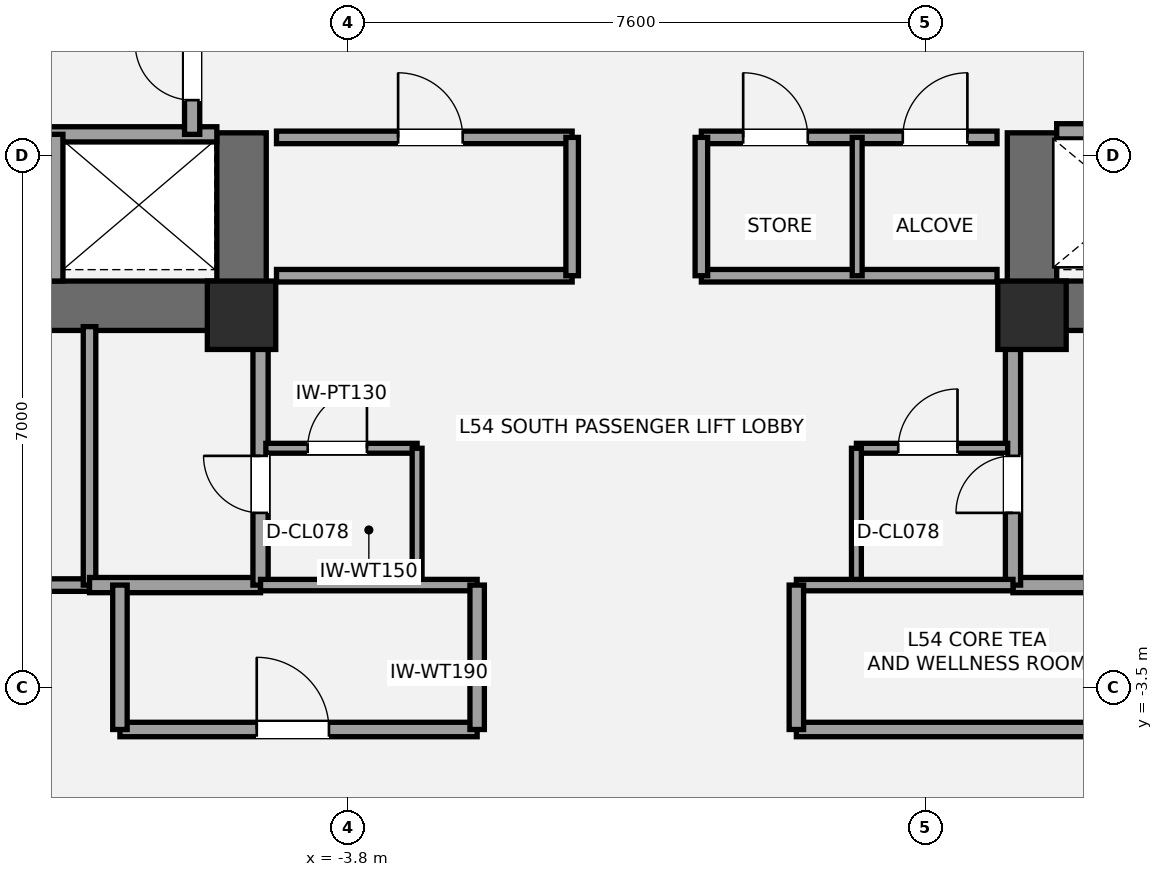
"""IFC4 building model, lengths in metres.
Left out: names, types, materials, properties, quantities, classifications, styles, units other than length and angle.
Written with IfcOpenShell. Run it as: python <this file> out.ifc"""

import sys

from ifc_helpers import new_model, si_unit, direction, frame, frame_2d, origin, origin_2d, place, context, subcontext, project, spatial, rectangle, extrude, element, fill, save


model = new_model("IFC4")
c1 = context("Model", 3, precision=1e-05, world=origin(), true_north=direction((0.0, 1.0)))
c2 = subcontext(c1, "Body", "Model", "MODEL_VIEW")
j1 = project(units=[si_unit("LENGTHUNIT", "METRE"), si_unit("PLANEANGLEUNIT", "RADIAN")], contexts=[c1])
p1 = place(None, origin())
s1 = spatial("IfcSite", under=j1, at=p1, CompositionType="ELEMENT")
p2 = place(p1, origin())
s2 = spatial("IfcBuilding", under=s1, at=p2, CompositionType="ELEMENT")
p3 = place(p2, frame((0.0, 0.0, 195.0)))
s3 = spatial("IfcBuildingStorey", under=s2, at=p3, CompositionType="ELEMENT", Elevation=195.0)
p4 = place(p3, frame((-4.875, 1.525, 0.0), z_axis=(0.0, 0.0, 1.0), x_axis=(-1.0, 0.0, 0.0)))
e1 = element("IfcWall", 1, at=p4, inside=s3, PredefinedType="SHEAR", context=c2, shape_type="SweptSolid", body=[
    extrude(rectangle(XDim=8.925, YDim=0.65, at=frame_2d((4.462, 0.0))), origin(), (0.0, 0.0, 1.0), 3.2),
])
p5 = place(p4, frame((5.425, 0.0, 0.0)))
e2 = element("IfcOpeningElement", 2, at=p5, cuts=e1, PredefinedType="OPENING", context=c2, shape_type="SweptSolid", body=[
    extrude(rectangle(XDim=1.05, YDim=2.15, at=frame_2d((0.525, 1.075))), frame((0.0, 0.335, 0.0), z_axis=(0.0, -1.0, 0.0), x_axis=(1.0, 0.0, 0.0)), (0.0, 0.0, 1.0), 0.67),
])
p6 = place(p4, frame((3.755, 0.0, 0.0)))
e3 = element("IfcOpeningElement", 3, at=p6, cuts=e1, PredefinedType="OPENING", context=c2, shape_type="SweptSolid", body=[
    extrude(rectangle(XDim=1.1, YDim=2.2, at=frame_2d((0.55, 1.1))), frame((0.0, 0.335, 0.0), z_axis=(0.0, -1.0, 0.0), x_axis=(1.0, 0.0, 0.0)), (0.0, 0.0, 1.0), 0.67),
])
p7 = place(p3, frame((-5.2, 1.2, 0.0), z_axis=(0.0, 0.0, 1.0), x_axis=(0.0, 1.0, 0.0)))
e4 = element("IfcWall", 4, at=p7, inside=s3, PredefinedType="SHEAR", context=c2, shape_type="SweptSolid", body=[
    extrude(rectangle(XDim=2.6, YDim=0.65, at=frame_2d((1.3, 0.0))), origin(), (0.0, 0.0, 1.0), 3.2),
])
p8 = place(p3, frame((13.8, 1.525, 0.0), z_axis=(0.0, 0.0, 1.0), x_axis=(-1.0, 0.0, 0.0)))
e5 = element("IfcWall", 5, at=p8, inside=s3, PredefinedType="SHEAR", context=c2, shape_type="SweptSolid", body=[
    extrude(rectangle(XDim=8.925, YDim=0.65, at=frame_2d((4.462, 0.0))), origin(), (0.0, 0.0, 1.0), 3.2),
])
p9 = place(p8, frame((2.45, 0.0, 0.0)))
e6 = element("IfcOpeningElement", 6, at=p9, cuts=e5, PredefinedType="OPENING", context=c2, shape_type="SweptSolid", body=[
    extrude(rectangle(XDim=1.05, YDim=2.15, at=frame_2d((0.525, 1.075))), frame((0.0, 0.335, 0.0), z_axis=(0.0, -1.0, 0.0), x_axis=(1.0, 0.0, 0.0)), (0.0, 0.0, 1.0), 0.67),
])
p10 = place(p8, frame((4.45, 0.0, 0.0)))
e7 = element("IfcOpeningElement", 7, at=p10, cuts=e5, PredefinedType="OPENING", context=c2, shape_type="SweptSolid", body=[
    extrude(rectangle(XDim=1.1, YDim=2.2, at=frame_2d((0.55, 1.1))), frame((0.0, 0.335, 0.0), z_axis=(0.0, -1.0, 0.0), x_axis=(1.0, 0.0, 0.0)), (0.0, 0.0, 1.0), 0.67),
])
p11 = place(p3, frame((5.2, 1.2, 0.0), z_axis=(0.0, 0.0, 1.0), x_axis=(0.0, 1.0, 0.0)))
e8 = element("IfcWall", 8, at=p11, inside=s3, PredefinedType="SHEAR", context=c2, shape_type="SweptSolid", body=[
    extrude(rectangle(XDim=2.6, YDim=0.65, at=frame_2d((1.3, 0.0))), origin(), (0.0, 0.0, 1.0), 3.2),
])
for number, where, z_axis, x_axis in (
    (9, (-5.2, 1.4, 0.0), (0.0, 0.0, 1.0), (1.0, 0.0, 0.0)),
    (10, (5.2, 1.4, 0.0), (0.0, 0.0, 1.0), (1.0, 0.0, 0.0)),
):
    element("IfcColumn", number, at=place(p3, frame(where, z_axis=z_axis, x_axis=x_axis)), inside=s3, PredefinedType="COLUMN", context=c2, shape_type="SweptSolid", body=[
        extrude(rectangle(XDim=0.9, YDim=0.9, at=origin_2d()), origin(), (0.0, 0.0, 1.0), 3.2),
    ])
p12 = place(p3, frame((-13.45, -2.15, 0.0), z_axis=(0.0, 0.0, 1.0), x_axis=(1.0, 0.0, 0.0)))
e11 = element("IfcWall", 11, at=p12, inside=s3, PredefinedType="PARTITIONING", context=c2, shape_type="SweptSolid", body=[
    extrude(rectangle(XDim=6.25, YDim=0.165, at=frame_2d((3.125, 0.0))), origin(), (0.0, 0.0, 1.0), 3.02),
])
p13 = place(p3, frame((-7.2, -2.15, 0.0), z_axis=(0.0, 0.0, 1.0), x_axis=(0.0, 1.0, 0.0)))
e12 = element("IfcWall", 12, at=p13, inside=s3, PredefinedType="PARTITIONING", context=c2, shape_type="SweptSolid", body=[
    extrude(rectangle(XDim=3.4, YDim=0.165, at=frame_2d((1.7, 0.0))), origin(), (0.0, 0.0, 1.0), 2.473),
])
p14 = place(p3, frame((-7.2, -2.15, 0.0), z_axis=(0.0, 0.0, 1.0), x_axis=(1.0, 0.0, 0.0)))
e13 = element("IfcWall", 13, at=p14, inside=s3, PredefinedType="SOLIDWALL", context=c2, shape_type="SweptSolid", body=[
    extrude(rectangle(XDim=2.25, YDim=0.2, at=frame_2d((1.125, 0.0))), origin(), (0.0, 0.0, 1.0), 3.02),
])
p15 = place(p3, frame((-4.95, -2.15, 0.0), z_axis=(0.0, 0.0, 1.0), x_axis=(0.0, 1.0, 0.0)))
e14 = element("IfcWall", 14, at=p15, inside=s3, PredefinedType="SOLIDWALL", context=c2, shape_type="SweptSolid", body=[
    extrude(rectangle(XDim=3.4, YDim=0.2, at=frame_2d((1.7, 0.0))), origin(), (0.0, 0.0, 1.0), 2.473),
])
p16 = place(p15, frame((0.95, 0.0, 0.0)))
e15 = element("IfcOpeningElement", 15, at=p16, cuts=e14, PredefinedType="OPENING", context=c2, shape_type="SweptSolid", body=[
    extrude(rectangle(XDim=0.75, YDim=2.1, at=frame_2d((0.375, 1.05))), frame((0.0, 0.11, 0.0), z_axis=(0.0, -1.0, 0.0), x_axis=(1.0, 0.0, 0.0)), (0.0, 0.0, 1.0), 0.22),
])
p17 = place(p3, frame((4.95, -2.15, 0.0), z_axis=(0.0, 0.0, 1.0), x_axis=(1.0, 0.0, 0.0)))
e16 = element("IfcWall", 16, at=p17, inside=s3, PredefinedType="SOLIDWALL", context=c2, shape_type="SweptSolid", body=[
    extrude(rectangle(XDim=2.25, YDim=0.2, at=frame_2d((1.125, 0.0))), origin(), (0.0, 0.0, 1.0), 3.02),
])
p18 = place(p3, frame((4.95, -2.15, 0.0), z_axis=(0.0, 0.0, 1.0), x_axis=(0.0, 1.0, 0.0)))
e17 = element("IfcWall", 17, at=p18, inside=s3, PredefinedType="SOLIDWALL", context=c2, shape_type="SweptSolid", body=[
    extrude(rectangle(XDim=3.4, YDim=0.2, at=frame_2d((1.7, 0.0))), origin(), (0.0, 0.0, 1.0), 2.473),
])
p19 = place(p18, frame((0.95, 0.0, 0.0)))
e18 = element("IfcOpeningElement", 18, at=p19, cuts=e17, PredefinedType="OPENING", context=c2, shape_type="SweptSolid", body=[
    extrude(rectangle(XDim=0.75, YDim=2.1, at=frame_2d((0.375, 1.05))), frame((0.0, 0.11, 0.0), z_axis=(0.0, -1.0, 0.0), x_axis=(1.0, 0.0, 0.0)), (0.0, 0.0, 1.0), 0.22),
])
p20 = place(p3, frame((-4.88, -0.35, 0.0), z_axis=(0.0, 0.0, 1.0), x_axis=(1.0, 0.0, 0.0)))
e19 = element("IfcWall", 19, at=p20, inside=s3, PredefinedType="PARTITIONING", context=c2, shape_type="SweptSolid", body=[
    extrude(rectangle(XDim=1.99, YDim=0.13, at=frame_2d((0.995, 0.0))), origin(), (0.0, 0.0, 1.0), 3.02),
])
p21 = place(p20, frame((0.55, 0.0, 0.0)))
e20 = element("IfcOpeningElement", 20, at=p21, cuts=e19, PredefinedType="OPENING", context=c2, shape_type="SweptSolid", body=[
    extrude(rectangle(XDim=0.78, YDim=2.1, at=frame_2d((0.39, 1.05))), frame((0.0, 0.075, 0.0), z_axis=(0.0, -1.0, 0.0), x_axis=(1.0, 0.0, 0.0)), (0.0, 0.0, 1.0), 0.15),
])
p22 = place(p3, frame((-2.89, -2.15, 0.0), z_axis=(0.0, 0.0, 1.0), x_axis=(0.0, 1.0, 0.0)))
e21 = element("IfcWall", 21, at=p22, inside=s3, PredefinedType="PARTITIONING", context=c2, shape_type="SweptSolid", body=[
    extrude(rectangle(XDim=1.8, YDim=0.13, at=frame_2d((0.9, 0.0))), origin(), (0.0, 0.0, 1.0), 3.02),
])
p23 = place(p3, frame((2.89, -0.35, 0.0), z_axis=(0.0, 0.0, 1.0), x_axis=(1.0, 0.0, 0.0)))
e22 = element("IfcWall", 22, at=p23, inside=s3, PredefinedType="PARTITIONING", context=c2, shape_type="SweptSolid", body=[
    extrude(rectangle(XDim=1.99, YDim=0.13, at=frame_2d((0.995, 0.0))), origin(), (0.0, 0.0, 1.0), 3.02),
])
p24 = place(p23, frame((0.55, 0.0, 0.0)))
e23 = element("IfcOpeningElement", 23, at=p24, cuts=e22, PredefinedType="OPENING", context=c2, shape_type="SweptSolid", body=[
    extrude(rectangle(XDim=0.78, YDim=2.1, at=frame_2d((0.39, 1.05))), frame((0.0, 0.075, 0.0), z_axis=(0.0, -1.0, 0.0), x_axis=(1.0, 0.0, 0.0)), (0.0, 0.0, 1.0), 0.15),
])
p25 = place(p3, frame((2.89, -2.15, 0.0), z_axis=(0.0, 0.0, 1.0), x_axis=(0.0, 1.0, 0.0)))
e24 = element("IfcWall", 24, at=p25, inside=s3, PredefinedType="PARTITIONING", context=c2, shape_type="SweptSolid", body=[
    extrude(rectangle(XDim=1.8, YDim=0.13, at=frame_2d((0.9, 0.0))), origin(), (0.0, 0.0, 1.0), 3.02),
])
p26 = place(p3, frame((-9.78, 3.78, 0.0), z_axis=(0.0, 0.0, 1.0), x_axis=(1.0, 0.0, 0.0)))
e25 = element("IfcWall", 25, at=p26, inside=s3, PredefinedType="SOLIDWALL", context=c2, shape_type="SweptSolid", body=[
    extrude(rectangle(XDim=4.255, YDim=0.2, at=frame_2d((2.127, 0.0))), origin(), (0.0, 0.0, 1.0), 3.02),
])
p27 = place(p3, frame((-7.65, 1.85, 0.0), z_axis=(0.0, 0.0, 1.0), x_axis=(0.0, 1.0, 0.0)))
e26 = element("IfcWall", 26, at=p27, inside=s3, PredefinedType="SOLIDWALL", context=c2, shape_type="SweptSolid", body=[
    extrude(rectangle(XDim=1.93, YDim=0.2, at=frame_2d((0.965, 0.0))), origin(), (0.0, 0.0, 1.0), 3.02),
])
p28 = place(p3, frame((-5.85, 3.78, 0.0), z_axis=(0.0, 0.0, 1.0), x_axis=(0.0, 1.0, 0.0)))
e27 = element("IfcWall", 27, at=p28, inside=s3, PredefinedType="SOLIDWALL", context=c2, shape_type="SweptSolid", body=[
    extrude(rectangle(XDim=1.69, YDim=0.2, at=frame_2d((0.845, 0.0))), origin(), (0.0, 0.0, 1.0), 3.02),
])
p29 = place(p28, frame((0.45, 0.0, 0.0)))
e28 = element("IfcOpeningElement", 28, at=p29, cuts=e27, PredefinedType="OPENING", context=c2, shape_type="SweptSolid", body=[
    extrude(rectangle(XDim=0.75, YDim=2.1, at=frame_2d((0.375, 1.05))), frame((0.0, 0.11, 0.0), z_axis=(0.0, -1.0, 0.0), x_axis=(1.0, 0.0, 0.0)), (0.0, 0.0, 1.0), 0.22),
])
p30 = place(p3, frame((5.525, 3.82, 0.0), z_axis=(0.0, 0.0, 1.0), x_axis=(1.0, 0.0, 0.0)))
e29 = element("IfcWall", 29, at=p30, inside=s3, PredefinedType="SOLIDWALL", context=c2, shape_type="SweptSolid", body=[
    extrude(rectangle(XDim=4.255, YDim=0.2, at=frame_2d((2.127, 0.0))), origin(), (0.0, 0.0, 1.0), 3.02),
])
p31 = place(p30, frame((0.65, 0.0, 0.0)))
e30 = element("IfcOpeningElement", 30, at=p31, cuts=e29, PredefinedType="OPENING", context=c2, shape_type="SweptSolid", body=[
    extrude(rectangle(XDim=1.2, YDim=2.2, at=frame_2d((0.6, 1.1))), frame((0.0, 0.11, 0.0), z_axis=(0.0, -1.0, 0.0), x_axis=(1.0, 0.0, 0.0)), (0.0, 0.0, 1.0), 0.22),
])
p32 = place(p3, frame((-4.74, 1.92, 0.0), z_axis=(0.0, 0.0, 1.0), x_axis=(1.0, 0.0, 0.0)))
e31 = element("IfcWall", 31, at=p32, inside=s3, PredefinedType="PARTITIONING", context=c2, shape_type="SweptSolid", body=[
    extrude(rectangle(XDim=3.89, YDim=0.165, at=frame_2d((1.945, 0.0))), origin(), (0.0, 0.0, 1.0), 2.16),
])
p33 = place(p3, frame((-4.74, 3.74, 0.0), z_axis=(0.0, 0.0, 1.0), x_axis=(1.0, 0.0, 0.0)))
e32 = element("IfcWall", 32, at=p33, inside=s3, PredefinedType="PARTITIONING", context=c2, shape_type="SweptSolid", body=[
    extrude(rectangle(XDim=3.89, YDim=0.165, at=frame_2d((1.945, 0.0))), origin(), (0.0, 0.0, 1.0), 3.02),
])
p34 = place(p33, frame((1.6, 0.0, 0.0)))
e33 = element("IfcOpeningElement", 33, at=p34, cuts=e32, PredefinedType="OPENING", context=c2, shape_type="SweptSolid", body=[
    extrude(rectangle(XDim=0.85, YDim=2.1, at=frame_2d((0.425, 1.05))), frame((0.0, 0.093, 0.0), z_axis=(0.0, -1.0, 0.0), x_axis=(1.0, 0.0, 0.0)), (0.0, 0.0, 1.0), 0.185),
])
p35 = place(p3, frame((-0.85, 1.92, 0.0), z_axis=(0.0, 0.0, 1.0), x_axis=(0.0, 1.0, 0.0)))
e34 = element("IfcWall", 34, at=p35, inside=s3, PredefinedType="PARTITIONING", context=c2, shape_type="SweptSolid", body=[
    extrude(rectangle(XDim=1.82, YDim=0.165, at=frame_2d((0.91, 0.0))), origin(), (0.0, 0.0, 1.0), 3.02),
])
p36 = place(p3, frame((0.85, 1.92, 0.0), z_axis=(0.0, 0.0, 1.0), x_axis=(1.0, 0.0, 0.0)))
e35 = element("IfcWall", 35, at=p36, inside=s3, PredefinedType="PARTITIONING", context=c2, shape_type="SweptSolid", body=[
    extrude(rectangle(XDim=3.89, YDim=0.165, at=frame_2d((1.945, 0.0))), origin(), (0.0, 0.0, 1.0), 2.16),
])
p37 = place(p3, frame((0.85, 3.74, 0.0), z_axis=(0.0, 0.0, 1.0), x_axis=(1.0, 0.0, 0.0)))
e36 = element("IfcWall", 36, at=p37, inside=s3, PredefinedType="PARTITIONING", context=c2, shape_type="SweptSolid", body=[
    extrude(rectangle(XDim=3.89, YDim=0.165, at=frame_2d((1.945, 0.0))), origin(), (0.0, 0.0, 1.0), 3.02),
])
p38 = place(p37, frame((0.55, 0.0, 0.0)))
e37 = element("IfcOpeningElement", 37, at=p38, cuts=e36, PredefinedType="OPENING", context=c2, shape_type="SweptSolid", body=[
    extrude(rectangle(XDim=0.85, YDim=2.1, at=frame_2d((0.425, 1.05))), frame((0.0, 0.093, 0.0), z_axis=(0.0, -1.0, 0.0), x_axis=(1.0, 0.0, 0.0)), (0.0, 0.0, 1.0), 0.185),
])
p39 = place(p37, frame((2.65, 0.0, 0.0)))
e38 = element("IfcOpeningElement", 38, at=p39, cuts=e36, PredefinedType="OPENING", context=c2, shape_type="SweptSolid", body=[
    extrude(rectangle(XDim=0.85, YDim=2.1, at=frame_2d((0.425, 1.05))), frame((0.0, 0.093, 0.0), z_axis=(0.0, -1.0, 0.0), x_axis=(1.0, 0.0, 0.0)), (0.0, 0.0, 1.0), 0.185),
])
p40 = place(p3, frame((0.85, 1.92, 0.0), z_axis=(0.0, 0.0, 1.0), x_axis=(0.0, 1.0, 0.0)))
e39 = element("IfcWall", 39, at=p40, inside=s3, PredefinedType="PARTITIONING", context=c2, shape_type="SweptSolid", body=[
    extrude(rectangle(XDim=1.82, YDim=0.165, at=frame_2d((0.91, 0.0))), origin(), (0.0, 0.0, 1.0), 3.02),
])
p41 = place(p3, frame((2.9, 1.92, 0.0), z_axis=(0.0, 0.0, 1.0), x_axis=(0.0, 1.0, 0.0)))
e40 = element("IfcWall", 40, at=p41, inside=s3, PredefinedType="PARTITIONING", context=c2, shape_type="SweptSolid", body=[
    extrude(rectangle(XDim=1.82, YDim=0.13, at=frame_2d((0.91, 0.0))), origin(), (0.0, 0.0, 1.0), 3.02),
])
p42 = place(p3, frame((-6.8, -4.05, 0.0), z_axis=(0.0, 0.0, 1.0), x_axis=(1.0, 0.0, 0.0)))
e41 = element("IfcWall", 41, at=p42, inside=s3, PredefinedType="PLUMBINGWALL", context=c2, shape_type="SweptSolid", body=[
    extrude(rectangle(XDim=4.7, YDim=0.19, at=frame_2d((2.35, 0.0))), origin(), (0.0, 0.0, 1.0), 2.473),
])
p43 = place(p42, frame((1.8, 0.0, 0.0)))
e42 = element("IfcOpeningElement", 42, at=p43, cuts=e41, PredefinedType="OPENING", context=c2, shape_type="SweptSolid", body=[
    extrude(rectangle(XDim=0.95, YDim=2.15, at=frame_2d((0.475, 1.075))), frame((0.0, 0.105, 0.0), z_axis=(0.0, -1.0, 0.0), x_axis=(1.0, 0.0, 0.0)), (0.0, 0.0, 1.0), 0.21),
])
p44 = place(p3, frame((-4.95, -2.15, 0.0), z_axis=(0.0, 0.0, 1.0), x_axis=(1.0, 0.0, 0.0)))
e43 = element("IfcWall", 43, at=p44, inside=s3, PredefinedType="PLUMBINGWALL", context=c2, shape_type="SweptSolid", body=[
    extrude(rectangle(XDim=2.85, YDim=0.15, at=frame_2d((1.425, 0.0))), origin(), (0.0, 0.0, 1.0), 3.02),
])
p45 = place(p3, frame((-6.8, -4.05, 0.0), z_axis=(0.0, 0.0, 1.0), x_axis=(0.0, 1.0, 0.0)))
e44 = element("IfcWall", 44, at=p45, inside=s3, PredefinedType="PLUMBINGWALL", context=c2, shape_type="SweptSolid", body=[
    extrude(rectangle(XDim=1.9, YDim=0.19, at=frame_2d((0.95, 0.0))), origin(), (0.0, 0.0, 1.0), 2.473),
])
p46 = place(p3, frame((-2.1, -4.05, 0.0), z_axis=(0.0, 0.0, 1.0), x_axis=(0.0, 1.0, 0.0)))
e45 = element("IfcWall", 45, at=p46, inside=s3, PredefinedType="PLUMBINGWALL", context=c2, shape_type="SweptSolid", body=[
    extrude(rectangle(XDim=1.9, YDim=0.19, at=frame_2d((0.95, 0.0))), origin(), (0.0, 0.0, 1.0), 3.02),
])
p47 = place(p3, frame((2.1, -4.05, 0.0), z_axis=(0.0, 0.0, 1.0), x_axis=(1.0, 0.0, 0.0)))
e46 = element("IfcWall", 46, at=p47, inside=s3, PredefinedType="PLUMBINGWALL", context=c2, shape_type="SweptSolid", body=[
    extrude(rectangle(XDim=11.35, YDim=0.19, at=frame_2d((5.675, 0.0))), origin(), (0.0, 0.0, 1.0), 3.02),
])
p48 = place(p47, frame((5.2, 0.0, 0.0)))
e47 = element("IfcOpeningElement", 47, at=p48, cuts=e46, PredefinedType="OPENING", context=c2, shape_type="SweptSolid", body=[
    extrude(rectangle(XDim=0.9, YDim=2.1, at=frame_2d((0.45, 1.05))), frame((0.0, 0.105, 0.0), z_axis=(0.0, -1.0, 0.0), x_axis=(1.0, 0.0, 0.0)), (0.0, 0.0, 1.0), 0.21),
])
p49 = place(p3, frame((2.1, -2.15, 0.0), z_axis=(0.0, 0.0, 1.0), x_axis=(1.0, 0.0, 0.0)))
e48 = element("IfcWall", 48, at=p49, inside=s3, PredefinedType="PLUMBINGWALL", context=c2, shape_type="SweptSolid", body=[
    extrude(rectangle(XDim=2.85, YDim=0.15, at=frame_2d((1.425, 0.0))), origin(), (0.0, 0.0, 1.0), 3.02),
])
p50 = place(p3, frame((2.1, -4.05, 0.0), z_axis=(0.0, 0.0, 1.0), x_axis=(0.0, 1.0, 0.0)))
e49 = element("IfcWall", 49, at=p50, inside=s3, PredefinedType="PLUMBINGWALL", context=c2, shape_type="SweptSolid", body=[
    extrude(rectangle(XDim=1.9, YDim=0.19, at=frame_2d((0.95, 0.0))), origin(), (0.0, 0.0, 1.0), 3.02),
])
p51 = place(p16, origin())
e50 = element("IfcDoor", 50, at=p51, inside=s3, OperationType="SINGLE_SWING_RIGHT", PredefinedType="DOOR", context=c2, shape_type="SweptSolid", body=[
    extrude(rectangle(XDim=0.75, YDim=2.1, at=frame_2d((0.375, 1.05))), frame((0.0, 0.025, 0.0), z_axis=(0.0, -1.0, 0.0), x_axis=(1.0, 0.0, 0.0)), (0.0, 0.0, 1.0), 0.05),
])
fill(e15, e50)
p52 = place(p19, origin())
e51 = element("IfcDoor", 51, at=p52, inside=s3, OperationType="SINGLE_SWING_LEFT", PredefinedType="DOOR", context=c2, shape_type="SweptSolid", body=[
    extrude(rectangle(XDim=0.75, YDim=2.1, at=frame_2d((0.375, 1.05))), frame((0.0, 0.025, 0.0), z_axis=(0.0, -1.0, 0.0), x_axis=(1.0, 0.0, 0.0)), (0.0, 0.0, 1.0), 0.05),
])
fill(e18, e51)
p53 = place(p21, origin())
e52 = element("IfcDoor", 52, at=p53, inside=s3, OperationType="SINGLE_SWING_RIGHT", PredefinedType="DOOR", context=c2, shape_type="SweptSolid", body=[
    extrude(rectangle(XDim=0.78, YDim=2.1, at=frame_2d((0.39, 1.05))), frame((0.0, 0.025, 0.0), z_axis=(0.0, -1.0, 0.0), x_axis=(1.0, 0.0, 0.0)), (0.0, 0.0, 1.0), 0.05),
])
fill(e20, e52)
p54 = place(p24, origin())
e53 = element("IfcDoor", 53, at=p54, inside=s3, OperationType="SINGLE_SWING_RIGHT", PredefinedType="DOOR", context=c2, shape_type="SweptSolid", body=[
    extrude(rectangle(XDim=0.78, YDim=2.1, at=frame_2d((0.39, 1.05))), frame((0.0, 0.025, 0.0), z_axis=(0.0, -1.0, 0.0), x_axis=(1.0, 0.0, 0.0)), (0.0, 0.0, 1.0), 0.05),
])
fill(e23, e53)
p55 = place(p29, origin())
e54 = element("IfcDoor", 54, at=p55, inside=s3, OperationType="SINGLE_SWING_RIGHT", PredefinedType="DOOR", context=c2, shape_type="SweptSolid", body=[
    extrude(rectangle(XDim=0.75, YDim=2.1, at=frame_2d((0.375, 1.05))), frame((0.0, 0.025, 0.0), z_axis=(0.0, -1.0, 0.0), x_axis=(1.0, 0.0, 0.0)), (0.0, 0.0, 1.0), 0.05),
])
fill(e28, e54)
p56 = place(p34, origin())
e55 = element("IfcDoor", 55, at=p56, inside=s3, OperationType="SINGLE_SWING_LEFT", PredefinedType="DOOR", context=c2, shape_type="SweptSolid", body=[
    extrude(rectangle(XDim=0.85, YDim=2.1, at=frame_2d((0.425, 1.05))), frame((0.0, 0.025, 0.0), z_axis=(0.0, -1.0, 0.0), x_axis=(1.0, 0.0, 0.0)), (0.0, 0.0, 1.0), 0.05),
])
fill(e33, e55)
p57 = place(p38, origin())
e56 = element("IfcDoor", 56, at=p57, inside=s3, OperationType="SINGLE_SWING_LEFT", PredefinedType="DOOR", context=c2, shape_type="SweptSolid", body=[
    extrude(rectangle(XDim=0.85, YDim=2.1, at=frame_2d((0.425, 1.05))), frame((0.0, 0.025, 0.0), z_axis=(0.0, -1.0, 0.0), x_axis=(1.0, 0.0, 0.0)), (0.0, 0.0, 1.0), 0.05),
])
fill(e37, e56)
p58 = place(p39, origin())
e57 = element("IfcDoor", 57, at=p58, inside=s3, OperationType="SINGLE_SWING_RIGHT", PredefinedType="DOOR", context=c2, shape_type="SweptSolid", body=[
    extrude(rectangle(XDim=0.85, YDim=2.1, at=frame_2d((0.425, 1.05))), frame((0.0, 0.025, 0.0), z_axis=(0.0, -1.0, 0.0), x_axis=(1.0, 0.0, 0.0)), (0.0, 0.0, 1.0), 0.05),
])
fill(e38, e57)
p59 = place(p43, origin())
e58 = element("IfcDoor", 58, at=p59, inside=s3, OperationType="SINGLE_SWING_LEFT", PredefinedType="DOOR", context=c2, shape_type="SweptSolid", body=[
    extrude(rectangle(XDim=0.95, YDim=2.15, at=frame_2d((0.475, 1.075))), frame((0.0, 0.025, 0.0), z_axis=(0.0, -1.0, 0.0), x_axis=(1.0, 0.0, 0.0)), (0.0, 0.0, 1.0), 0.05),
])
fill(e42, e58)
save(model, sys.argv[1])
